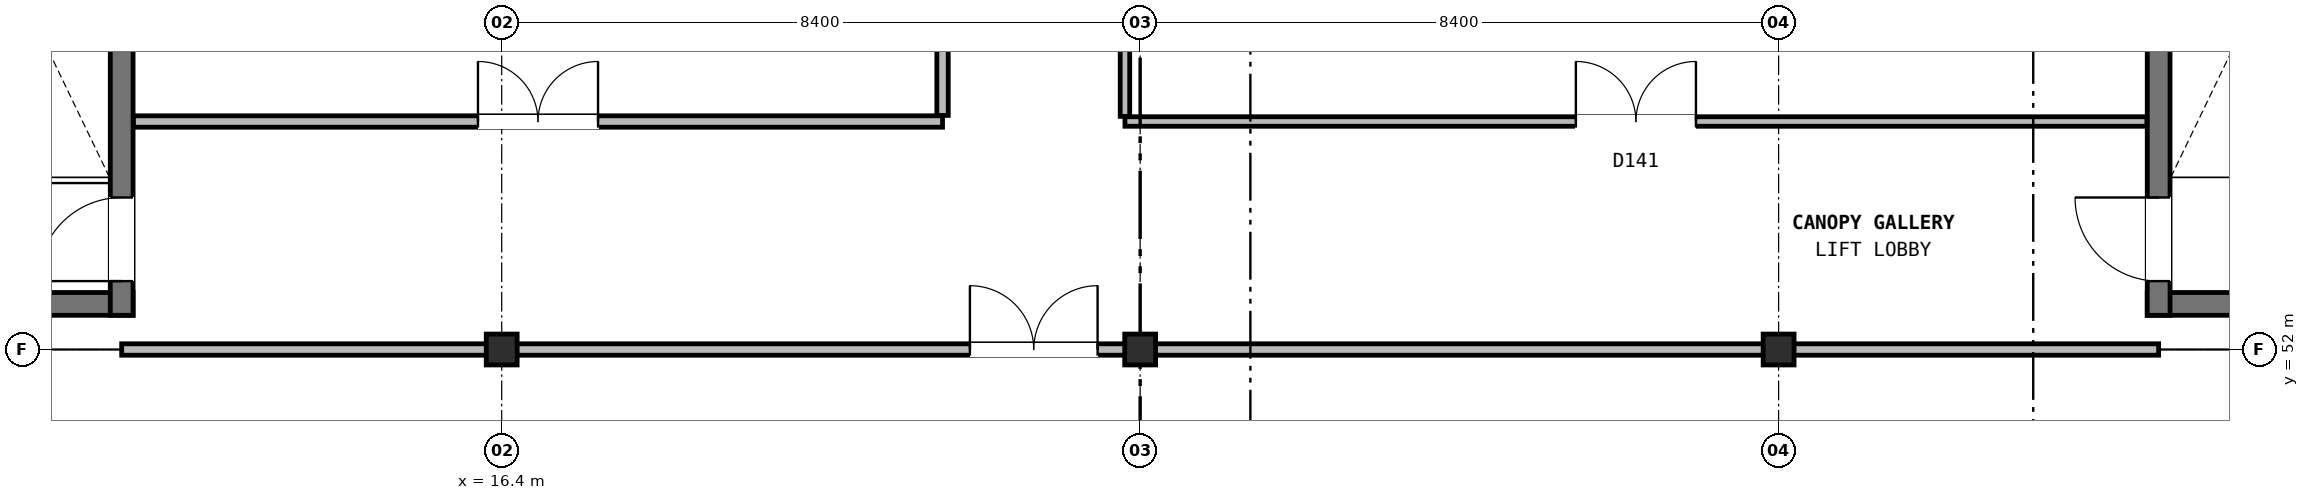
"""IFC4 building model, lengths in metres.
Left out: names, types, materials, properties, quantities, classifications, styles, units other than length and angle.
Written with IfcOpenShell. Run it as: python <this file> out.ifc"""

import sys

from ifc_helpers import new_model, si_unit, direction, frame, frame_2d, origin, origin_2d, place, context, subcontext, project, spatial, rectangle, hollow_circle, extrude, element, fill, save


model = new_model("IFC4")
c1 = context("Model", 3, precision=1e-05, world=origin(), true_north=direction((0.0, 1.0)))
c2 = subcontext(c1, "Body", "Model", "MODEL_VIEW")
j1 = project(units=[si_unit("LENGTHUNIT", "METRE"), si_unit("PLANEANGLEUNIT", "RADIAN")], contexts=[c1])
p1 = place(None, origin())
s1 = spatial("IfcSite", under=j1, at=p1, CompositionType="ELEMENT")
p2 = place(p1, origin())
s2 = spatial("IfcBuilding", under=s1, at=p2, CompositionType="ELEMENT")
p3 = place(p2, frame((0.0, 0.0, 4.8)))
s3 = spatial("IfcBuildingStorey", under=s2, at=p3, CompositionType="ELEMENT", Elevation=4.8)
for number, where, z_axis, x_axis in (
    (1, (16.4, 52.0, 0.0), (0.0, 0.0, 1.0), (1.0, 0.0, 0.0)),
    (2, (24.8, 52.0, 0.0), (0.0, 0.0, 1.0), (1.0, 0.0, 0.0)),
    (3, (33.2, 52.0, 0.0), (0.0, 0.0, 1.0), (1.0, 0.0, 0.0)),
):
    element("IfcColumn", number, at=place(p3, frame(where, z_axis=z_axis, x_axis=x_axis)), inside=s3, PredefinedType="COLUMN", context=c2, shape_type="SweptSolid", body=[
        extrude(hollow_circle(Radius=0.203, WallThickness=0.016, at=origin_2d()), origin(), (0.0, 0.0, 1.0), 4.2),
    ])
p4 = place(p3, frame((7.85, 52.6, 0.0), z_axis=(0.0, 0.0, 1.0), x_axis=(1.0, 0.0, 0.0)))
e4 = element("IfcWall", 4, at=p4, inside=s3, PredefinedType="SHEAR", context=c2, shape_type="SweptSolid", body=[
    extrude(rectangle(XDim=3.7, YDim=0.3, at=frame_2d((1.85, 0.0))), origin(), (0.0, 0.0, 1.0), 4.2),
])
p5 = place(p3, frame((11.4, 52.45, 0.0), z_axis=(0.0, 0.0, 1.0), x_axis=(0.0, 1.0, 0.0)))
e5 = element("IfcWall", 5, at=p5, inside=s3, PredefinedType="SHEAR", context=c2, shape_type="SweptSolid", body=[
    extrude(rectangle(XDim=8.5, YDim=0.3, at=frame_2d((4.25, 0.0))), origin(), (0.0, 0.0, 1.0), 4.2),
])
p6 = place(p5, frame((0.45, 0.0, 0.0)))
e6 = element("IfcOpeningElement", 6, at=p6, cuts=e5, PredefinedType="OPENING", context=c2, shape_type="SweptSolid", body=[
    extrude(rectangle(XDim=1.1, YDim=2.2, at=frame_2d((0.55, 1.1))), frame((0.0, 0.16, 0.0), z_axis=(0.0, -1.0, 0.0), x_axis=(1.0, 0.0, 0.0)), (0.0, 0.0, 1.0), 0.32),
])
p7 = place(p3, frame((38.05, 52.6, 0.0), z_axis=(0.0, 0.0, 1.0), x_axis=(1.0, 0.0, 0.0)))
e7 = element("IfcWall", 7, at=p7, inside=s3, PredefinedType="SHEAR", context=c2, shape_type="SweptSolid", body=[
    extrude(rectangle(XDim=3.7, YDim=0.3, at=frame_2d((1.85, 0.0))), origin(), (0.0, 0.0, 1.0), 4.2),
])
p8 = place(p3, frame((38.2, 52.45, 0.0), z_axis=(0.0, 0.0, 1.0), x_axis=(0.0, 1.0, 0.0)))
e8 = element("IfcWall", 8, at=p8, inside=s3, PredefinedType="SHEAR", context=c2, shape_type="SweptSolid", body=[
    extrude(rectangle(XDim=8.5, YDim=0.3, at=frame_2d((4.25, 0.0))), origin(), (0.0, 0.0, 1.0), 4.2),
])
p9 = place(p8, frame((0.45, 0.0, 0.0)))
e9 = element("IfcOpeningElement", 9, at=p9, cuts=e8, PredefinedType="OPENING", context=c2, shape_type="SweptSolid", body=[
    extrude(rectangle(XDim=1.1, YDim=2.2, at=frame_2d((0.55, 1.1))), frame((0.0, 0.16, 0.0), z_axis=(0.0, -1.0, 0.0), x_axis=(1.0, 0.0, 0.0)), (0.0, 0.0, 1.0), 0.32),
])
p10 = place(p3, frame((11.4, 52.0, 0.0), z_axis=(0.0, 0.0, 1.0), x_axis=(1.0, 0.0, 0.0)))
e10 = element("IfcWall", 10, at=p10, inside=s3, PredefinedType="PARTITIONING", context=c2, shape_type="SweptSolid", body=[
    extrude(rectangle(XDim=26.8, YDim=0.15, at=frame_2d((13.4, 0.0))), origin(), (0.0, 0.0, 1.0), 3.545),
])
p11 = place(p10, frame((11.16, 0.0, 0.0)))
e11 = element("IfcOpeningElement", 11, at=p11, cuts=e10, PredefinedType="OPENING", context=c2, shape_type="SweptSolid", body=[
    extrude(rectangle(XDim=1.68, YDim=2.3, at=frame_2d((0.84, 1.15))), frame((0.0, 0.085, 0.0), z_axis=(0.0, -1.0, 0.0), x_axis=(1.0, 0.0, 0.0)), (0.0, 0.0, 1.0), 0.17),
])
p12 = place(p3, frame((11.555, 55.0, 0.0), z_axis=(0.0, 0.0, 1.0), x_axis=(1.0, 0.0, 0.0)))
e12 = element("IfcWall", 12, at=p12, inside=s3, PredefinedType="PARTITIONING", context=c2, shape_type="SweptSolid", body=[
    extrude(rectangle(XDim=10.645, YDim=0.15, at=frame_2d((5.323, 0.0))), origin(), (0.0, 0.0, 1.0), 3.865),
])
p13 = place(p12, frame((4.532, 0.0, 0.0)))
e13 = element("IfcOpeningElement", 13, at=p13, cuts=e12, PredefinedType="OPENING", context=c2, shape_type="SweptSolid", body=[
    extrude(rectangle(XDim=1.58, YDim=2.25, at=frame_2d((0.79, 1.125))), frame((0.0, 0.085, 0.0), z_axis=(0.0, -1.0, 0.0), x_axis=(1.0, 0.0, 0.0)), (0.0, 0.0, 1.0), 0.17),
])
p14 = place(p3, frame((24.6, 55.0, 0.0), z_axis=(0.0, 0.0, 1.0), x_axis=(1.0, 0.0, 0.0)))
e14 = element("IfcWall", 14, at=p14, inside=s3, PredefinedType="PARTITIONING", context=c2, shape_type="SweptSolid", body=[
    extrude(rectangle(XDim=13.445, YDim=0.125, at=frame_2d((6.722, 0.0))), origin(), (0.0, 0.0, 1.0), 3.865),
])
p15 = place(p14, frame((5.933, 0.0, 0.0)))
e15 = element("IfcOpeningElement", 15, at=p15, cuts=e14, PredefinedType="OPENING", context=c2, shape_type="SweptSolid", body=[
    extrude(rectangle(XDim=1.58, YDim=2.25, at=frame_2d((0.79, 1.125))), frame((0.0, 0.073, 0.0), z_axis=(0.0, -1.0, 0.0), x_axis=(1.0, 0.0, 0.0)), (0.0, 0.0, 1.0), 0.145),
])
p16 = place(p3, frame((22.2, 55.08, 0.0), z_axis=(0.0, 0.0, 1.0), x_axis=(0.0, 1.0, 0.0)))
e16 = element("IfcWall", 16, at=p16, inside=s3, PredefinedType="PARTITIONING", context=c2, shape_type="SweptSolid", body=[
    extrude(rectangle(XDim=2.59, YDim=0.15, at=frame_2d((1.295, 0.0))), origin(), (0.0, 0.0, 1.0), 3.865),
])
p17 = place(p3, frame((24.6, 55.067, 0.0), z_axis=(0.0, 0.0, 1.0), x_axis=(0.0, 1.0, 0.0)))
e17 = element("IfcWall", 17, at=p17, inside=s3, PredefinedType="PARTITIONING", context=c2, shape_type="SweptSolid", body=[
    extrude(rectangle(XDim=2.603, YDim=0.125, at=frame_2d((1.301, 0.0))), origin(), (0.0, 0.0, 1.0), 3.545),
])
p18 = place(p6, origin())
e18 = element("IfcDoor", 18, at=p18, inside=s3, OperationType="SINGLE_SWING_LEFT", PredefinedType="DOOR", context=c2, shape_type="SweptSolid", body=[
    extrude(rectangle(XDim=1.1, YDim=2.2, at=frame_2d((0.55, 1.1))), frame((0.0, 0.025, 0.0), z_axis=(0.0, -1.0, 0.0), x_axis=(1.0, 0.0, 0.0)), (0.0, 0.0, 1.0), 0.05),
])
fill(e6, e18)
p19 = place(p9, origin())
e19 = element("IfcDoor", 19, at=p19, inside=s3, OperationType="SINGLE_SWING_RIGHT", PredefinedType="DOOR", context=c2, shape_type="SweptSolid", body=[
    extrude(rectangle(XDim=1.1, YDim=2.2, at=frame_2d((0.55, 1.1))), frame((0.0, 0.025, 0.0), z_axis=(0.0, -1.0, 0.0), x_axis=(1.0, 0.0, 0.0)), (0.0, 0.0, 1.0), 0.05),
])
fill(e9, e19)
p20 = place(p11, origin())
e20 = element("IfcDoor", 20, at=p20, inside=s3, OperationType="DOUBLE_DOOR_SINGLE_SWING", PredefinedType="DOOR", context=c2, shape_type="SweptSolid", body=[
    extrude(rectangle(XDim=1.68, YDim=2.3, at=frame_2d((0.84, 1.15))), frame((0.0, 0.025, 0.0), z_axis=(0.0, -1.0, 0.0), x_axis=(1.0, 0.0, 0.0)), (0.0, 0.0, 1.0), 0.05),
])
fill(e11, e20)
p21 = place(p13, origin())
e21 = element("IfcDoor", 21, at=p21, inside=s3, OperationType="DOUBLE_DOOR_SINGLE_SWING", PredefinedType="DOOR", context=c2, shape_type="SweptSolid", body=[
    extrude(rectangle(XDim=1.58, YDim=2.25, at=frame_2d((0.79, 1.125))), frame((0.0, 0.025, 0.0), z_axis=(0.0, -1.0, 0.0), x_axis=(1.0, 0.0, 0.0)), (0.0, 0.0, 1.0), 0.05),
])
fill(e13, e21)
p22 = place(p15, origin())
e22 = element("IfcDoor", 22, at=p22, inside=s3, OperationType="DOUBLE_DOOR_SINGLE_SWING", PredefinedType="DOOR", context=c2, shape_type="SweptSolid", body=[
    extrude(rectangle(XDim=1.58, YDim=2.25, at=frame_2d((0.79, 1.125))), frame((0.0, 0.025, 0.0), z_axis=(0.0, -1.0, 0.0), x_axis=(1.0, 0.0, 0.0)), (0.0, 0.0, 1.0), 0.05),
])
fill(e15, e22)
save(model, sys.argv[1])
